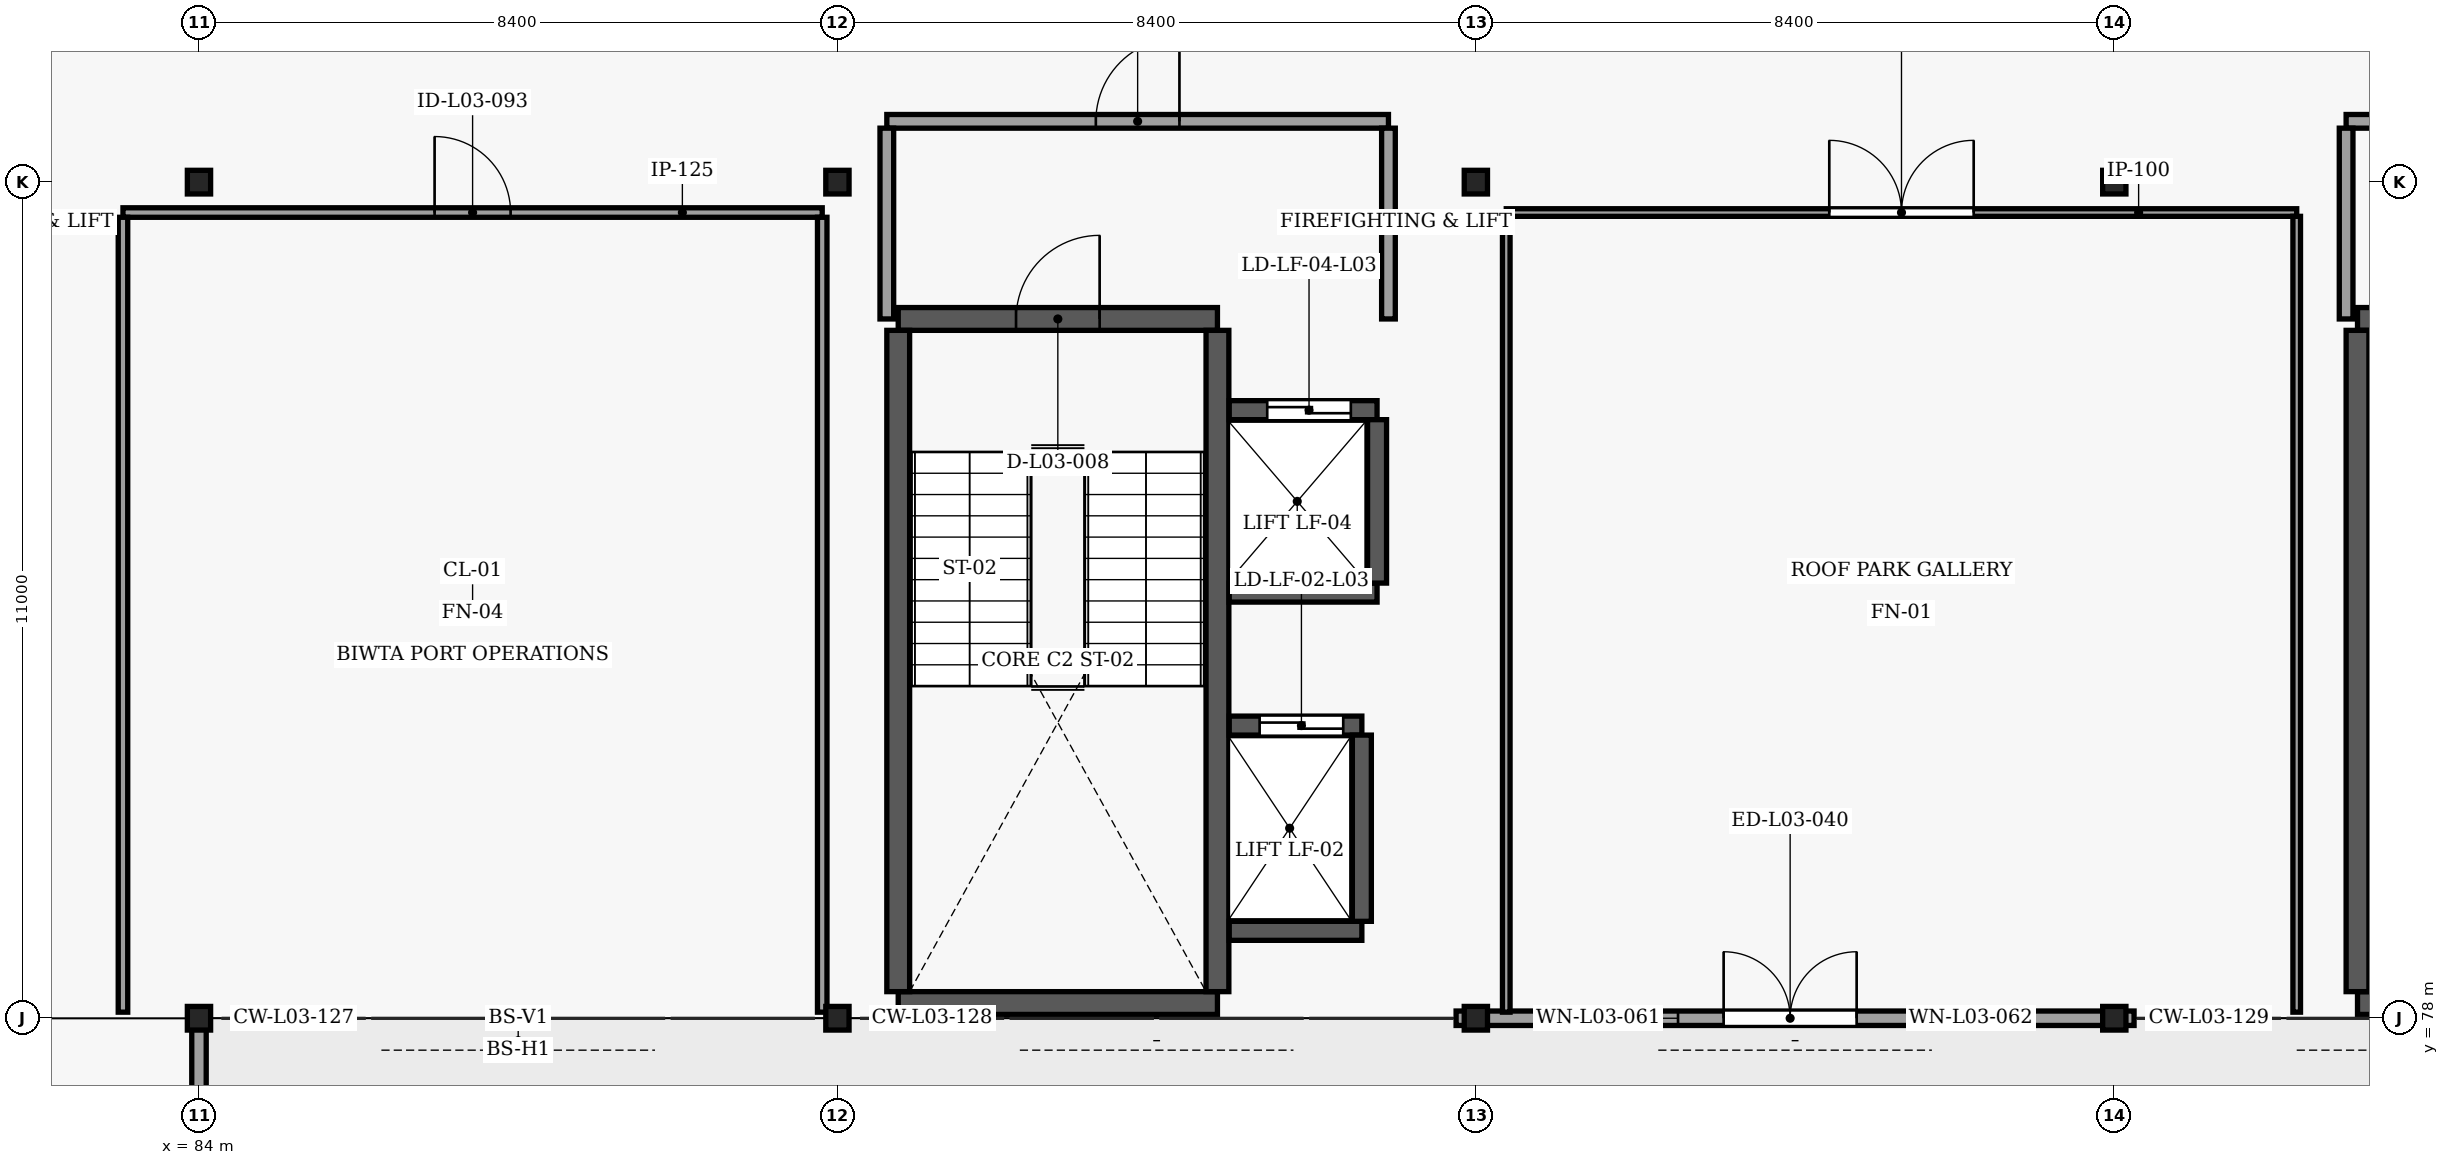
"""IFC4 building model, lengths in metres.
Left out: names, types, materials, properties, quantities, classifications, styles, units other than length and angle.
Written with IfcOpenShell. Run it as: python <this file> out.ifc"""

import sys

from ifc_helpers import new_model, si_unit, direction, frame, frame_2d, origin, origin_2d, place, context, subcontext, project, spatial, rectangle, i_section, extrude, element, fill, save


model = new_model("IFC4")
c1 = context("Model", 3, precision=1e-05, world=origin(), true_north=direction((0.0, 1.0)))
c2 = subcontext(c1, "Body", "Model", "MODEL_VIEW")
j1 = project(units=[si_unit("LENGTHUNIT", "METRE"), si_unit("PLANEANGLEUNIT", "RADIAN")], contexts=[c1])
p1 = place(None, origin())
s1 = spatial("IfcSite", under=j1, at=p1, CompositionType="ELEMENT")
p2 = place(p1, origin())
s2 = spatial("IfcBuilding", under=s1, at=p2, CompositionType="ELEMENT")
p3 = place(p2, frame((0.0, 0.0, 10.2)))
s3 = spatial("IfcBuildingStorey", under=s2, at=p3, CompositionType="ELEMENT", Elevation=10.2)
for number, where, z_axis, x_axis in (
    (1, (84.0, 78.0, 0.0), (0.0, 0.0, 1.0), (1.0, 0.0, 0.0)),
    (2, (92.4, 78.0, 0.0), (0.0, 0.0, 1.0), (1.0, 0.0, 0.0)),
    (3, (100.8, 78.0, 0.0), (0.0, 0.0, 1.0), (1.0, 0.0, 0.0)),
    (4, (109.2, 78.0, 0.0), (0.0, 0.0, 1.0), (1.0, 0.0, 0.0)),
    (5, (84.0, 89.0, 0.0), (0.0, 0.0, 1.0), (1.0, 0.0, 0.0)),
    (6, (92.4, 89.0, 0.0), (0.0, 0.0, 1.0), (1.0, 0.0, 0.0)),
    (7, (100.8, 89.0, 0.0), (0.0, 0.0, 1.0), (1.0, 0.0, 0.0)),
    (8, (109.2, 89.0, 0.0), (0.0, 0.0, 1.0), (1.0, 0.0, 0.0)),
):
    element("IfcColumn", number, at=place(p3, frame(where, z_axis=z_axis, x_axis=x_axis)), inside=s3, PredefinedType="COLUMN", context=c2, shape_type="SweptSolid", body=[
        extrude(i_section(OverallWidth=0.306, OverallDepth=0.311, WebThickness=0.011, FlangeThickness=0.017, FilletRadius=0.015, at=origin_2d()), origin(), (0.0, 0.0, 1.0), 3.92),
    ])
p4 = place(p3, frame((93.2, 78.2, 0.0), z_axis=(0.0, 0.0, 1.0), x_axis=(1.0, 0.0, 0.0)))
e9 = element("IfcWall", 9, at=p4, inside=s3, PredefinedType="SHEAR", context=c2, shape_type="SweptSolid", body=[
    extrude(rectangle(XDim=4.2, YDim=0.3, at=frame_2d((2.1, 0.0))), origin(), (0.0, 0.0, 1.0), 3.92),
])
p5 = place(p3, frame((93.2, 87.2, 0.0), z_axis=(0.0, 0.0, 1.0), x_axis=(1.0, 0.0, 0.0)))
e10 = element("IfcWall", 10, at=p5, inside=s3, PredefinedType="SHEAR", context=c2, shape_type="SweptSolid", body=[
    extrude(rectangle(XDim=4.2, YDim=0.3, at=frame_2d((2.1, 0.0))), origin(), (0.0, 0.0, 1.0), 3.92),
])
p6 = place(p5, frame((1.55, 0.0, 0.0)))
e11 = element("IfcOpeningElement", 11, at=p6, cuts=e10, PredefinedType="OPENING", context=c2, shape_type="SweptSolid", body=[
    extrude(rectangle(XDim=1.1, YDim=2.2, at=frame_2d((0.55, 1.1))), frame((0.0, 0.16, 0.0), z_axis=(0.0, -1.0, 0.0), x_axis=(1.0, 0.0, 0.0)), (0.0, 0.0, 1.0), 0.32),
])
for number, where, z_axis, x_axis in (
    (12, (93.2, 78.35, 0.0), (0.0, 0.0, 1.0), (0.0, 1.0, 0.0)),
    (13, (97.4, 78.35, 0.0), (0.0, 0.0, 1.0), (0.0, 1.0, 0.0)),
):
    element("IfcWall", number, at=place(p3, frame(where, z_axis=z_axis, x_axis=x_axis)), inside=s3, PredefinedType="SHEAR", context=c2, shape_type="SweptSolid", body=[
        extrude(rectangle(XDim=8.7, YDim=0.3, at=frame_2d((4.35, 0.0))), origin(), (0.0, 0.0, 1.0), 3.92),
    ])
p7 = place(p3, frame((97.555, 79.15, 0.0), z_axis=(0.0, 0.0, 1.0), x_axis=(1.0, 0.0, 0.0)))
e14 = element("IfcWall", 14, at=p7, inside=s3, PredefinedType="SOLIDWALL", context=c2, shape_type="SweptSolid", body=[
    extrude(rectangle(XDim=1.745, YDim=0.25, at=frame_2d((0.873, 0.0))), origin(), (0.0, 0.0, 1.0), 3.92),
])
p8 = place(p3, frame((97.555, 81.85, 0.0), z_axis=(0.0, 0.0, 1.0), x_axis=(1.0, 0.0, 0.0)))
e15 = element("IfcWall", 15, at=p8, inside=s3, PredefinedType="SOLIDWALL", context=c2, shape_type="SweptSolid", body=[
    extrude(rectangle(XDim=1.745, YDim=0.25, at=frame_2d((0.873, 0.0))), origin(), (0.0, 0.0, 1.0), 3.92),
])
p9 = place(p8, frame((0.4, 0.0, 0.0)))
e16 = element("IfcOpeningElement", 16, at=p9, cuts=e15, PredefinedType="OPENING", context=c2, shape_type="SweptSolid", body=[
    extrude(rectangle(XDim=1.1, YDim=2.2, at=frame_2d((0.55, 1.1))), frame((0.0, 0.135, 0.0), z_axis=(0.0, -1.0, 0.0), x_axis=(1.0, 0.0, 0.0)), (0.0, 0.0, 1.0), 0.27),
])
p10 = place(p3, frame((99.3, 79.275, 0.0), z_axis=(0.0, 0.0, 1.0), x_axis=(0.0, 1.0, 0.0)))
e17 = element("IfcWall", 17, at=p10, inside=s3, PredefinedType="SOLIDWALL", context=c2, shape_type="SweptSolid", body=[
    extrude(rectangle(XDim=2.45, YDim=0.25, at=frame_2d((1.225, 0.0))), origin(), (0.0, 0.0, 1.0), 3.92),
])
p11 = place(p3, frame((97.555, 83.6, 0.0), z_axis=(0.0, 0.0, 1.0), x_axis=(1.0, 0.0, 0.0)))
e18 = element("IfcWall", 18, at=p11, inside=s3, PredefinedType="SOLIDWALL", context=c2, shape_type="SweptSolid", body=[
    extrude(rectangle(XDim=1.945, YDim=0.25, at=frame_2d((0.973, 0.0))), origin(), (0.0, 0.0, 1.0), 3.92),
])
p12 = place(p3, frame((97.555, 86.0, 0.0), z_axis=(0.0, 0.0, 1.0), x_axis=(1.0, 0.0, 0.0)))
e19 = element("IfcWall", 19, at=p12, inside=s3, PredefinedType="SOLIDWALL", context=c2, shape_type="SweptSolid", body=[
    extrude(rectangle(XDim=1.945, YDim=0.25, at=frame_2d((0.973, 0.0))), origin(), (0.0, 0.0, 1.0), 3.92),
])
p13 = place(p12, frame((0.5, 0.0, 0.0)))
e20 = element("IfcOpeningElement", 20, at=p13, cuts=e19, PredefinedType="OPENING", context=c2, shape_type="SweptSolid", body=[
    extrude(rectangle(XDim=1.1, YDim=2.2, at=frame_2d((0.55, 1.1))), frame((0.0, 0.135, 0.0), z_axis=(0.0, -1.0, 0.0), x_axis=(1.0, 0.0, 0.0)), (0.0, 0.0, 1.0), 0.27),
])
p14 = place(p3, frame((99.5, 83.725, 0.0), z_axis=(0.0, 0.0, 1.0), x_axis=(0.0, 1.0, 0.0)))
e21 = element("IfcWall", 21, at=p14, inside=s3, PredefinedType="SOLIDWALL", context=c2, shape_type="SweptSolid", body=[
    extrude(rectangle(XDim=2.15, YDim=0.25, at=frame_2d((1.075, 0.0))), origin(), (0.0, 0.0, 1.0), 3.92),
])
p15 = place(p3, frame((112.4, 78.2, 0.0), z_axis=(0.0, 0.0, 1.0), x_axis=(1.0, 0.0, 0.0)))
e22 = element("IfcWall", 22, at=p15, inside=s3, PredefinedType="SHEAR", context=c2, shape_type="SweptSolid", body=[
    extrude(rectangle(XDim=4.1, YDim=0.3, at=frame_2d((2.05, 0.0))), origin(), (0.0, 0.0, 1.0), 3.92),
])
p16 = place(p3, frame((112.4, 87.2, 0.0), z_axis=(0.0, 0.0, 1.0), x_axis=(1.0, 0.0, 0.0)))
e23 = element("IfcWall", 23, at=p16, inside=s3, PredefinedType="SHEAR", context=c2, shape_type="SweptSolid", body=[
    extrude(rectangle(XDim=4.1, YDim=0.3, at=frame_2d((2.05, 0.0))), origin(), (0.0, 0.0, 1.0), 3.92),
])
p17 = place(p16, frame((1.5, 0.0, 0.0)))
e24 = element("IfcOpeningElement", 24, at=p17, cuts=e23, PredefinedType="OPENING", context=c2, shape_type="SweptSolid", body=[
    extrude(rectangle(XDim=1.1, YDim=2.2, at=frame_2d((0.55, 1.1))), frame((0.0, 0.16, 0.0), z_axis=(0.0, -1.0, 0.0), x_axis=(1.0, 0.0, 0.0)), (0.0, 0.0, 1.0), 0.32),
])
p18 = place(p3, frame((112.4, 78.35, 0.0), z_axis=(0.0, 0.0, 1.0), x_axis=(0.0, 1.0, 0.0)))
e25 = element("IfcWall", 25, at=p18, inside=s3, PredefinedType="SHEAR", context=c2, shape_type="SweptSolid", body=[
    extrude(rectangle(XDim=8.7, YDim=0.3, at=frame_2d((4.35, 0.0))), origin(), (0.0, 0.0, 1.0), 3.92),
])
p19 = place(p3, frame((84.0, 66.135, 0.0), z_axis=(0.0, 0.0, 1.0), x_axis=(0.0, 1.0, 0.0)))
e26 = element("IfcWall", 26, at=p19, inside=s3, PredefinedType="SOLIDWALL", context=c2, shape_type="SweptSolid", body=[
    extrude(rectangle(XDim=11.725, YDim=0.19, at=frame_2d((5.862, 0.0))), origin(), (0.0, 0.0, 1.0), 3.655),
])
p20 = place(p19, frame((4.665, 0.0, 0.0)))
e27 = element("IfcOpeningElement", 27, at=p20, cuts=e26, PredefinedType="OPENING", context=c2, shape_type="SweptSolid", body=[
    extrude(rectangle(XDim=1.8, YDim=2.25, at=frame_2d((0.9, 1.125))), frame((0.0, 0.105, 0.0), z_axis=(0.0, -1.0, 0.0), x_axis=(1.0, 0.0, 0.0)), (0.0, 0.0, 1.0), 0.21),
])
p21 = place(p3, frame((100.54, 78.0, 0.0), z_axis=(0.0, 0.0, 1.0), x_axis=(1.0, 0.0, 0.0)))
e28 = element("IfcWall", 28, at=p21, inside=s3, PredefinedType="SOLIDWALL", context=c2, shape_type="SweptSolid", body=[
    extrude(rectangle(XDim=8.92, YDim=0.19, at=frame_2d((4.46, 0.0))), origin(), (0.0, 0.0, 1.0), 3.501),
])
p22 = place(p21, frame((3.52, 0.0, 0.0)))
e29 = element("IfcOpeningElement", 29, at=p22, cuts=e28, PredefinedType="OPENING", context=c2, shape_type="SweptSolid", body=[
    extrude(rectangle(XDim=1.75, YDim=2.24, at=frame_2d((0.875, 1.12))), frame((0.0, 0.105, 0.0), z_axis=(0.0, -1.0, 0.0), x_axis=(1.0, 0.0, 0.0)), (0.0, 0.0, 1.0), 0.21),
])
p23 = place(p21, frame((1.42, 0.0, 0.95)))
e30 = element("IfcOpeningElement", 30, at=p23, cuts=e28, PredefinedType="OPENING", context=c2, shape_type="SweptSolid", body=[
    extrude(rectangle(XDim=1.5, YDim=1.5, at=frame_2d((0.75, 0.75))), frame((0.0, 0.105, 0.0), z_axis=(0.0, -1.0, 0.0), x_axis=(1.0, 0.0, 0.0)), (0.0, 0.0, 1.0), 0.21),
])
p24 = place(p21, frame((6.02, 0.0, 0.95)))
e31 = element("IfcOpeningElement", 31, at=p24, cuts=e28, PredefinedType="OPENING", context=c2, shape_type="SweptSolid", body=[
    extrude(rectangle(XDim=1.5, YDim=1.5, at=frame_2d((0.75, 0.75))), frame((0.0, 0.105, 0.0), z_axis=(0.0, -1.0, 0.0), x_axis=(1.0, 0.0, 0.0)), (0.0, 0.0, 1.0), 0.21),
])
p25 = place(p3, frame((93.05, 89.8, 0.0), z_axis=(0.0, 0.0, 1.0), x_axis=(1.0, 0.0, 0.0)))
e32 = element("IfcWall", 32, at=p25, inside=s3, PredefinedType="SOLIDWALL", context=c2, shape_type="SweptSolid", body=[
    extrude(rectangle(XDim=6.6, YDim=0.18, at=frame_2d((3.3, 0.0))), origin(), (0.0, 0.0, 1.0), 3.9),
])
p26 = place(p25, frame((2.75, 0.0, 0.0)))
e33 = element("IfcOpeningElement", 33, at=p26, cuts=e32, PredefinedType="OPENING", context=c2, shape_type="SweptSolid", body=[
    extrude(rectangle(XDim=1.1, YDim=2.2, at=frame_2d((0.55, 1.1))), frame((0.0, 0.1, 0.0), z_axis=(0.0, -1.0, 0.0), x_axis=(1.0, 0.0, 0.0)), (0.0, 0.0, 1.0), 0.2),
])
for number, where, z_axis, x_axis in (
    (34, (93.05, 87.2, 0.0), (0.0, 0.0, 1.0), (0.0, 1.0, 0.0)),
    (35, (99.65, 87.2, 0.0), (0.0, 0.0, 1.0), (0.0, 1.0, 0.0)),
):
    element("IfcWall", number, at=place(p3, frame(where, z_axis=z_axis, x_axis=x_axis)), inside=s3, PredefinedType="SOLIDWALL", context=c2, shape_type="SweptSolid", body=[
        extrude(rectangle(XDim=2.51, YDim=0.18, at=frame_2d((1.255, 0.0))), origin(), (0.0, 0.0, 1.0), 3.503),
    ])
p27 = place(p3, frame((112.25, 89.8, 0.0), z_axis=(0.0, 0.0, 1.0), x_axis=(1.0, 0.0, 0.0)))
e36 = element("IfcWall", 36, at=p27, inside=s3, PredefinedType="SOLIDWALL", context=c2, shape_type="SweptSolid", body=[
    extrude(rectangle(XDim=4.4, YDim=0.18, at=frame_2d((2.2, 0.0))), origin(), (0.0, 0.0, 1.0), 3.9),
])
p28 = place(p27, frame((1.65, 0.0, 0.0)))
e37 = element("IfcOpeningElement", 37, at=p28, cuts=e36, PredefinedType="OPENING", context=c2, shape_type="SweptSolid", body=[
    extrude(rectangle(XDim=1.1, YDim=2.2, at=frame_2d((0.55, 1.1))), frame((0.0, 0.1, 0.0), z_axis=(0.0, -1.0, 0.0), x_axis=(1.0, 0.0, 0.0)), (0.0, 0.0, 1.0), 0.2),
])
p29 = place(p3, frame((112.25, 87.2, 0.0), z_axis=(0.0, 0.0, 1.0), x_axis=(0.0, 1.0, 0.0)))
e38 = element("IfcWall", 38, at=p29, inside=s3, PredefinedType="SOLIDWALL", context=c2, shape_type="SweptSolid", body=[
    extrude(rectangle(XDim=2.51, YDim=0.18, at=frame_2d((1.255, 0.0))), origin(), (0.0, 0.0, 1.0), 3.503),
])
p30 = place(p3, frame((83.0, 88.6, 0.0), z_axis=(0.0, 0.0, 1.0), x_axis=(1.0, 0.0, 0.0)))
e39 = element("IfcWall", 39, at=p30, inside=s3, PredefinedType="PARTITIONING", context=c2, shape_type="SweptSolid", body=[
    extrude(rectangle(XDim=9.2, YDim=0.125, at=frame_2d((4.6, 0.0))), origin(), (0.0, 0.0, 1.0), 3.51),
])
p31 = place(p30, frame((4.1, 0.0, 0.0)))
e40 = element("IfcOpeningElement", 40, at=p31, cuts=e39, PredefinedType="OPENING", context=c2, shape_type="SweptSolid", body=[
    extrude(rectangle(XDim=1.0, YDim=2.15, at=frame_2d((0.5, 1.075))), frame((0.0, 0.073, 0.0), z_axis=(0.0, -1.0, 0.0), x_axis=(1.0, 0.0, 0.0)), (0.0, 0.0, 1.0), 0.145),
])
p32 = place(p3, frame((83.0, 78.08, 0.0), z_axis=(0.0, 0.0, 1.0), x_axis=(0.0, 1.0, 0.0)))
e41 = element("IfcWall", 41, at=p32, inside=s3, PredefinedType="PARTITIONING", context=c2, shape_type="SweptSolid", body=[
    extrude(rectangle(XDim=10.458, YDim=0.125, at=frame_2d((5.229, 0.0))), origin(), (0.0, 0.0, 1.0), 3.9),
])
p33 = place(p3, frame((92.2, 78.08, 0.0), z_axis=(0.0, 0.0, 1.0), x_axis=(0.0, 1.0, 0.0)))
e42 = element("IfcWall", 42, at=p33, inside=s3, PredefinedType="PARTITIONING", context=c2, shape_type="SweptSolid", body=[
    extrude(rectangle(XDim=10.458, YDim=0.125, at=frame_2d((5.229, 0.0))), origin(), (0.0, 0.0, 1.0), 3.51),
])
p34 = place(p3, frame((101.2, 88.6, 0.0), z_axis=(0.0, 0.0, 1.0), x_axis=(1.0, 0.0, 0.0)))
e43 = element("IfcWall", 43, at=p34, inside=s3, PredefinedType="MOVABLE", context=c2, shape_type="SweptSolid", body=[
    extrude(rectangle(XDim=10.4, YDim=0.1, at=frame_2d((5.2, 0.0))), origin(), (0.0, 0.0, 1.0), 3.51),
])
p35 = place(p34, frame((4.25, 0.0, 0.0)))
e44 = element("IfcOpeningElement", 44, at=p35, cuts=e43, PredefinedType="OPENING", context=c2, shape_type="SweptSolid", body=[
    extrude(rectangle(XDim=1.9, YDim=2.35, at=frame_2d((0.95, 1.175))), frame((0.0, 0.06, 0.0), z_axis=(0.0, -1.0, 0.0), x_axis=(1.0, 0.0, 0.0)), (0.0, 0.0, 1.0), 0.12),
])
p36 = place(p3, frame((101.2, 78.08, 0.0), z_axis=(0.0, 0.0, 1.0), x_axis=(0.0, 1.0, 0.0)))
e45 = element("IfcWall", 45, at=p36, inside=s3, PredefinedType="MOVABLE", context=c2, shape_type="SweptSolid", body=[
    extrude(rectangle(XDim=10.47, YDim=0.1, at=frame_2d((5.235, 0.0))), origin(), (0.0, 0.0, 1.0), 3.607),
])
p37 = place(p3, frame((111.6, 78.08, 0.0), z_axis=(0.0, 0.0, 1.0), x_axis=(0.0, 1.0, 0.0)))
e46 = element("IfcWall", 46, at=p37, inside=s3, PredefinedType="MOVABLE", context=c2, shape_type="SweptSolid", body=[
    extrude(rectangle(XDim=10.47, YDim=0.1, at=frame_2d((5.235, 0.0))), origin(), (0.0, 0.0, 1.0), 3.9),
])
p38 = place(p6, origin())
e47 = element("IfcDoor", 47, at=p38, inside=s3, OperationType="SINGLE_SWING_RIGHT", PredefinedType="DOOR", context=c2, shape_type="SweptSolid", body=[
    extrude(rectangle(XDim=1.1, YDim=2.2, at=frame_2d((0.55, 1.1))), frame((0.0, 0.025, 0.0), z_axis=(0.0, -1.0, 0.0), x_axis=(1.0, 0.0, 0.0)), (0.0, 0.0, 1.0), 0.05),
])
fill(e11, e47)
p39 = place(p9, origin())
e48 = element("IfcDoor", 48, at=p39, inside=s3, OperationType="SLIDING_TO_LEFT", PredefinedType="DOOR", context=c2, shape_type="SweptSolid", body=[
    extrude(rectangle(XDim=1.1, YDim=2.2, at=frame_2d((0.55, 1.1))), frame((0.0, 0.025, 0.0), z_axis=(0.0, -1.0, 0.0), x_axis=(1.0, 0.0, 0.0)), (0.0, 0.0, 1.0), 0.05),
])
fill(e16, e48)
p40 = place(p13, origin())
e49 = element("IfcDoor", 49, at=p40, inside=s3, OperationType="SLIDING_TO_LEFT", PredefinedType="DOOR", context=c2, shape_type="SweptSolid", body=[
    extrude(rectangle(XDim=1.1, YDim=2.2, at=frame_2d((0.55, 1.1))), frame((0.0, 0.025, 0.0), z_axis=(0.0, -1.0, 0.0), x_axis=(1.0, 0.0, 0.0)), (0.0, 0.0, 1.0), 0.05),
])
fill(e20, e49)
p41 = place(p22, origin())
e50 = element("IfcDoor", 50, at=p41, inside=s3, OperationType="DOUBLE_DOOR_SINGLE_SWING", PredefinedType="DOOR", context=c2, shape_type="SweptSolid", body=[
    extrude(rectangle(XDim=1.75, YDim=2.24, at=frame_2d((0.875, 1.12))), frame((0.0, 0.025, 0.0), z_axis=(0.0, -1.0, 0.0), x_axis=(1.0, 0.0, 0.0)), (0.0, 0.0, 1.0), 0.05),
])
fill(e29, e50)
p42 = place(p23, origin())
e51 = element("IfcWindow", 51, at=p42, inside=s3, PartitioningType="SINGLE_PANEL", PredefinedType="WINDOW", context=c2, shape_type="SweptSolid", body=[
    extrude(rectangle(XDim=1.5, YDim=1.5, at=frame_2d((0.75, 0.75))), frame((0.0, 0.03, 0.0), z_axis=(0.0, -1.0, 0.0), x_axis=(1.0, 0.0, 0.0)), (0.0, 0.0, 1.0), 0.06),
])
fill(e30, e51)
p43 = place(p24, origin())
e52 = element("IfcWindow", 52, at=p43, inside=s3, PartitioningType="SINGLE_PANEL", PredefinedType="WINDOW", context=c2, shape_type="SweptSolid", body=[
    extrude(rectangle(XDim=1.5, YDim=1.5, at=frame_2d((0.75, 0.75))), frame((0.0, 0.03, 0.0), z_axis=(0.0, -1.0, 0.0), x_axis=(1.0, 0.0, 0.0)), (0.0, 0.0, 1.0), 0.06),
])
fill(e31, e52)
p44 = place(p26, origin())
e53 = element("IfcDoor", 53, at=p44, inside=s3, OperationType="SINGLE_SWING_RIGHT", PredefinedType="DOOR", context=c2, shape_type="SweptSolid", body=[
    extrude(rectangle(XDim=1.1, YDim=2.2, at=frame_2d((0.55, 1.1))), frame((0.0, 0.025, 0.0), z_axis=(0.0, -1.0, 0.0), x_axis=(1.0, 0.0, 0.0)), (0.0, 0.0, 1.0), 0.05),
])
fill(e33, e53)
p45 = place(p31, origin())
e54 = element("IfcDoor", 54, at=p45, inside=s3, OperationType="SINGLE_SWING_LEFT", PredefinedType="DOOR", context=c2, shape_type="SweptSolid", body=[
    extrude(rectangle(XDim=1.0, YDim=2.15, at=frame_2d((0.5, 1.075))), frame((0.0, 0.025, 0.0), z_axis=(0.0, -1.0, 0.0), x_axis=(1.0, 0.0, 0.0)), (0.0, 0.0, 1.0), 0.05),
])
fill(e40, e54)
p46 = place(p35, origin())
e55 = element("IfcDoor", 55, at=p46, inside=s3, OperationType="DOUBLE_DOOR_SINGLE_SWING", PredefinedType="DOOR", context=c2, shape_type="SweptSolid", body=[
    extrude(rectangle(XDim=1.9, YDim=2.35, at=frame_2d((0.95, 1.175))), frame((0.0, 0.025, 0.0), z_axis=(0.0, -1.0, 0.0), x_axis=(1.0, 0.0, 0.0)), (0.0, 0.0, 1.0), 0.05),
])
fill(e44, e55)
save(model, sys.argv[1])
